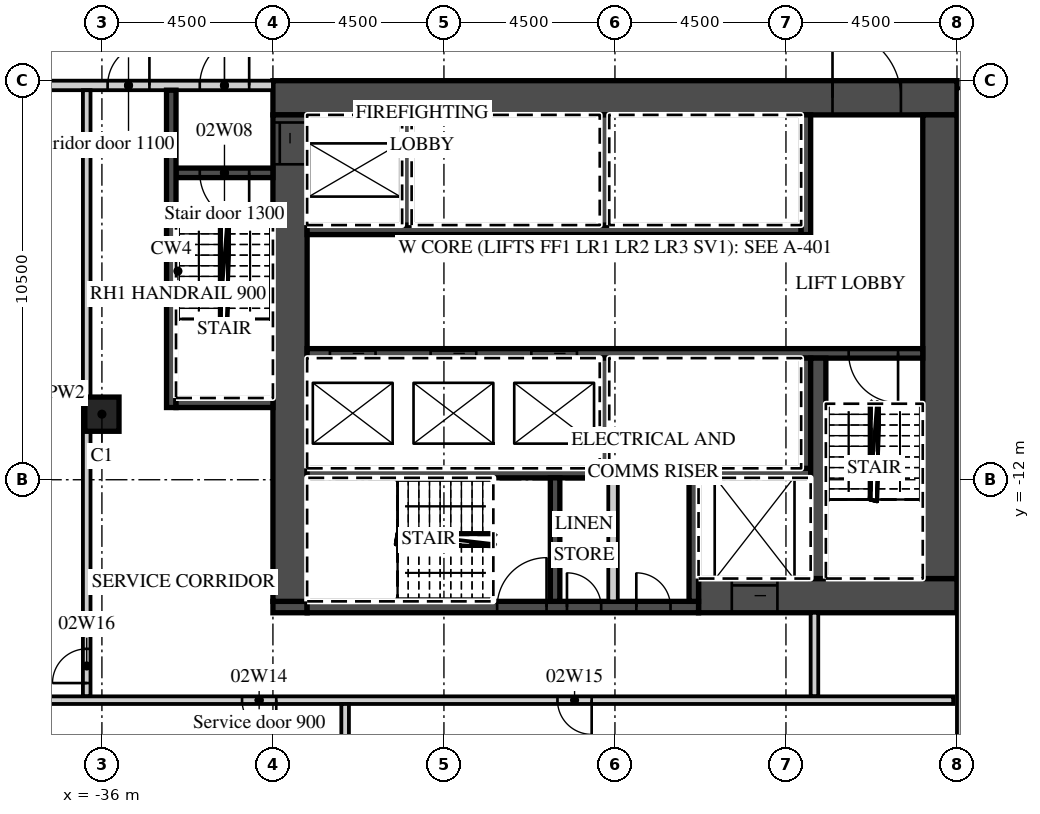
"""IFC4 building model, lengths in metres.
Left out: names, types, materials, properties, quantities, classifications, styles, units other than length and angle.
Written with IfcOpenShell. Run it as: python <this file> out.ifc"""

import sys

from ifc_helpers import new_model, si_unit, direction, frame, frame_2d, origin, origin_2d, place, context, subcontext, project, spatial, rectangle, extrude, element, fill, save


model = new_model("IFC4")
c1 = context("Model", 3, precision=1e-05, world=origin(), true_north=direction((0.0, 1.0)))
c2 = subcontext(c1, "Body", "Model", "MODEL_VIEW")
j1 = project(units=[si_unit("LENGTHUNIT", "METRE"), si_unit("PLANEANGLEUNIT", "RADIAN")], contexts=[c1])
p1 = place(None, origin())
s1 = spatial("IfcSite", under=j1, at=p1, CompositionType="ELEMENT")
p2 = place(p1, origin())
s2 = spatial("IfcBuilding", under=s1, at=p2, CompositionType="ELEMENT")
p3 = place(p2, frame((0.0, 0.0, 17.0)))
s3 = spatial("IfcBuildingStorey", under=s2, at=p3, CompositionType="ELEMENT", Elevation=17.0)
p4 = place(p3, frame((-36.0, -10.275, 0.0), z_axis=(0.0, 0.0, 1.0), x_axis=(1.0, 0.0, 0.0)))
e1 = element("IfcColumn", 1, at=p4, inside=s3, PredefinedType="COLUMN", context=c2, shape_type="SweptSolid", body=[
    extrude(rectangle(XDim=0.9, YDim=0.9, at=origin_2d()), origin(), (0.0, 0.0, 1.0), 6.5),
])
p5 = place(p3, frame((-31.5, -1.95, 0.0), z_axis=(0.0, 0.0, 1.0), x_axis=(1.0, 0.0, 0.0)))
e2 = element("IfcWall", 2, at=p5, inside=s3, PredefinedType="SHEAR", context=c2, shape_type="SweptSolid", body=[
    extrude(rectangle(XDim=18.0, YDim=0.9, at=frame_2d((9.0, 0.0))), origin(), (0.0, 0.0, 1.0), 6.05),
])
p6 = place(p5, frame((14.725, 0.0, 0.0)))
e3 = element("IfcOpeningElement", 3, at=p6, cuts=e2, PredefinedType="OPENING", context=c2, shape_type="SweptSolid", body=[
    extrude(rectangle(XDim=1.8, YDim=2.1, at=frame_2d((0.9, 1.05))), frame((0.0, 0.46, 0.0), z_axis=(0.0, -1.0, 0.0), x_axis=(1.0, 0.0, 0.0)), (0.0, 0.0, 1.0), 0.92),
])
p7 = place(p3, frame((-20.3, -15.05, 0.0), z_axis=(0.0, 0.0, 1.0), x_axis=(1.0, 0.0, 0.0)))
e4 = element("IfcWall", 4, at=p7, inside=s3, PredefinedType="SHEAR", context=c2, shape_type="SweptSolid", body=[
    extrude(rectangle(XDim=6.8, YDim=0.9, at=frame_2d((3.4, 0.0))), origin(), (0.0, 0.0, 1.0), 6.05),
])
p8 = place(p7, frame((0.875, 0.0, 0.0)))
e5 = element("IfcOpeningElement", 5, at=p8, cuts=e4, PredefinedType="OPENING", context=c2, shape_type="SweptSolid", body=[
    extrude(rectangle(XDim=1.2, YDim=2.1, at=frame_2d((0.6, 1.05))), frame((0.0, 0.46, 0.0), z_axis=(0.0, -1.0, 0.0), x_axis=(1.0, 0.0, 0.0)), (0.0, 0.0, 1.0), 0.92),
])
p9 = place(p3, frame((-31.5, -15.35, 0.0), z_axis=(0.0, 0.0, 1.0), x_axis=(1.0, 0.0, 0.0)))
e6 = element("IfcWall", 6, at=p9, inside=s3, PredefinedType="SHEAR", context=c2, shape_type="SweptSolid", body=[
    extrude(rectangle(XDim=0.9, YDim=0.3, at=frame_2d((0.45, 0.0))), origin(), (0.0, 0.0, 1.0), 6.05),
])
p10 = place(p3, frame((-30.6, -15.35, 0.0), z_axis=(0.0, 0.0, 1.0), x_axis=(1.0, 0.0, 0.0)))
e7 = element("IfcWall", 7, at=p10, inside=s3, PredefinedType="SHEAR", context=c2, shape_type="SweptSolid", body=[
    extrude(rectangle(XDim=10.3, YDim=0.3, at=frame_2d((5.15, 0.0))), origin(), (0.0, 0.0, 1.0), 6.05),
])
p11 = place(p10, frame((5.0, 0.0, 0.0)))
e8 = element("IfcOpeningElement", 8, at=p11, cuts=e7, PredefinedType="OPENING", context=c2, shape_type="SweptSolid", body=[
    extrude(rectangle(XDim=1.3, YDim=2.1, at=frame_2d((0.65, 1.05))), frame((0.0, 0.16, 0.0), z_axis=(0.0, -1.0, 0.0), x_axis=(1.0, 0.0, 0.0)), (0.0, 0.0, 1.0), 0.32),
])
p12 = place(p10, frame((6.837, 0.0, 0.0)))
e9 = element("IfcOpeningElement", 9, at=p12, cuts=e7, PredefinedType="OPENING", context=c2, shape_type="SweptSolid", body=[
    extrude(rectangle(XDim=0.9, YDim=2.1, at=frame_2d((0.45, 1.05))), frame((0.0, 0.16, 0.0), z_axis=(0.0, -1.0, 0.0), x_axis=(1.0, 0.0, 0.0)), (0.0, 0.0, 1.0), 0.32),
])
p13 = place(p10, frame((8.663, 0.0, 0.0)))
e10 = element("IfcOpeningElement", 10, at=p13, cuts=e7, PredefinedType="OPENING", context=c2, shape_type="SweptSolid", body=[
    extrude(rectangle(XDim=0.9, YDim=2.1, at=frame_2d((0.45, 1.05))), frame((0.0, 0.16, 0.0), z_axis=(0.0, -1.0, 0.0), x_axis=(1.0, 0.0, 0.0)), (0.0, 0.0, 1.0), 0.32),
])
p14 = place(p3, frame((-31.05, -15.2, 0.0), z_axis=(0.0, 0.0, 1.0), x_axis=(0.0, 1.0, 0.0)))
e11 = element("IfcWall", 11, at=p14, inside=s3, PredefinedType="SHEAR", context=c2, shape_type="SweptSolid", body=[
    extrude(rectangle(XDim=12.8, YDim=0.9, at=frame_2d((6.4, 0.0))), origin(), (0.0, 0.0, 1.0), 6.05),
])
p15 = place(p14, frame((11.5, 0.0, 0.0)))
e12 = element("IfcOpeningElement", 12, at=p15, cuts=e11, PredefinedType="OPENING", context=c2, shape_type="SweptSolid", body=[
    extrude(rectangle(XDim=1.1, YDim=2.1, at=frame_2d((0.55, 1.05))), frame((0.0, 0.46, 0.0), z_axis=(0.0, -1.0, 0.0), x_axis=(1.0, 0.0, 0.0)), (0.0, 0.0, 1.0), 0.92),
])
p16 = place(p3, frame((-13.95, -14.6, 0.0), z_axis=(0.0, 0.0, 1.0), x_axis=(0.0, 1.0, 0.0)))
e13 = element("IfcWall", 13, at=p16, inside=s3, PredefinedType="SHEAR", context=c2, shape_type="SweptSolid", body=[
    extrude(rectangle(XDim=12.2, YDim=0.9, at=frame_2d((6.1, 0.0))), origin(), (0.0, 0.0, 1.0), 6.05),
])
p17 = place(p3, frame((-30.6, -5.425, 0.0), z_axis=(0.0, 0.0, 1.0), x_axis=(1.0, 0.0, 0.0)))
e14 = element("IfcWall", 14, at=p17, inside=s3, PredefinedType="SHEAR", context=c2, shape_type="SweptSolid", body=[
    extrude(rectangle(XDim=13.0, YDim=0.25, at=frame_2d((6.5, 0.0))), origin(), (0.0, 0.0, 1.0), 6.05),
])
p18 = place(p3, frame((-17.475, -5.55, 0.0), z_axis=(0.0, 0.0, 1.0), x_axis=(0.0, 1.0, 0.0)))
e15 = element("IfcWall", 15, at=p18, inside=s3, PredefinedType="SHEAR", context=c2, shape_type="SweptSolid", body=[
    extrude(rectangle(XDim=3.15, YDim=0.25, at=frame_2d((1.575, 0.0))), origin(), (0.0, 0.0, 1.0), 6.05),
])
for number, where, z_axis, x_axis in (
    (16, (-27.975, -5.3, 0.0), (0.0, 0.0, 1.0), (0.0, 1.0, 0.0)),
    (17, (-22.775, -5.3, 0.0), (0.0, 0.0, 1.0), (0.0, 1.0, 0.0)),
):
    element("IfcWall", number, at=place(p3, frame(where, z_axis=z_axis, x_axis=x_axis)), inside=s3, PredefinedType="SHEAR", context=c2, shape_type="SweptSolid", body=[
        extrude(rectangle(XDim=2.9, YDim=0.25, at=frame_2d((1.45, 0.0))), origin(), (0.0, 0.0, 1.0), 6.05),
    ])
p19 = place(p3, frame((-30.6, -8.675, 0.0), z_axis=(0.0, 0.0, 1.0), x_axis=(1.0, 0.0, 0.0)))
e18 = element("IfcWall", 18, at=p19, inside=s3, PredefinedType="SHEAR", context=c2, shape_type="SweptSolid", body=[
    extrude(rectangle(XDim=16.2, YDim=0.25, at=frame_2d((8.1, 0.0))), origin(), (0.0, 0.0, 1.0), 6.05),
])
p20 = place(p19, frame((0.6, 0.0, 0.0)))
e19 = element("IfcOpeningElement", 19, at=p20, cuts=e18, PredefinedType="OPENING", context=c2, shape_type="SweptSolid", body=[
    extrude(rectangle(XDim=1.2, YDim=2.1, at=frame_2d((0.6, 1.05))), frame((0.0, 0.135, 0.0), z_axis=(0.0, -1.0, 0.0), x_axis=(1.0, 0.0, 0.0)), (0.0, 0.0, 1.0), 0.27),
])
p21 = place(p19, frame((3.25, 0.0, 0.0)))
e20 = element("IfcOpeningElement", 20, at=p21, cuts=e18, PredefinedType="OPENING", context=c2, shape_type="SweptSolid", body=[
    extrude(rectangle(XDim=1.2, YDim=2.1, at=frame_2d((0.6, 1.05))), frame((0.0, 0.135, 0.0), z_axis=(0.0, -1.0, 0.0), x_axis=(1.0, 0.0, 0.0)), (0.0, 0.0, 1.0), 0.27),
])
p22 = place(p19, frame((5.9, 0.0, 0.0)))
e21 = element("IfcOpeningElement", 21, at=p22, cuts=e18, PredefinedType="OPENING", context=c2, shape_type="SweptSolid", body=[
    extrude(rectangle(XDim=1.2, YDim=2.1, at=frame_2d((0.6, 1.05))), frame((0.0, 0.135, 0.0), z_axis=(0.0, -1.0, 0.0), x_axis=(1.0, 0.0, 0.0)), (0.0, 0.0, 1.0), 0.27),
])
p23 = place(p19, frame((14.25, 0.0, 0.0)))
e22 = element("IfcOpeningElement", 22, at=p23, cuts=e18, PredefinedType="OPENING", context=c2, shape_type="SweptSolid", body=[
    extrude(rectangle(XDim=1.3, YDim=2.1, at=frame_2d((0.65, 1.05))), frame((0.0, 0.135, 0.0), z_axis=(0.0, -1.0, 0.0), x_axis=(1.0, 0.0, 0.0)), (0.0, 0.0, 1.0), 0.27),
])
p24 = place(p3, frame((-30.6, -11.825, 0.0), z_axis=(0.0, 0.0, 1.0), x_axis=(1.0, 0.0, 0.0)))
e23 = element("IfcWall", 23, at=p24, inside=s3, PredefinedType="SHEAR", context=c2, shape_type="SweptSolid", body=[
    extrude(rectangle(XDim=13.25, YDim=0.25, at=frame_2d((6.625, 0.0))), origin(), (0.0, 0.0, 1.0), 6.05),
])
for number, where, z_axis, x_axis in (
    (24, (-17.475, -11.7, 0.0), (0.0, 0.0, 1.0), (0.0, 1.0, 0.0)),
    (25, (-22.775, -11.7, 0.0), (0.0, 0.0, 1.0), (0.0, 1.0, 0.0)),
):
    element("IfcWall", number, at=place(p3, frame(where, z_axis=z_axis, x_axis=x_axis)), inside=s3, PredefinedType="SHEAR", context=c2, shape_type="SweptSolid", body=[
        extrude(rectangle(XDim=2.9, YDim=0.25, at=frame_2d((1.45, 0.0))), origin(), (0.0, 0.0, 1.0), 6.05),
    ])
p25 = place(p3, frame((-17.15, -14.6, 0.0), z_axis=(0.0, 0.0, 1.0), x_axis=(0.0, 1.0, 0.0)))
e26 = element("IfcWall", 26, at=p25, inside=s3, PredefinedType="SHEAR", context=c2, shape_type="SweptSolid", body=[
    extrude(rectangle(XDim=5.8, YDim=0.4, at=frame_2d((2.9, 0.0))), origin(), (0.0, 0.0, 1.0), 6.05),
])
for number, where, z_axis, x_axis in (
    (27, (-20.425, -15.2, 0.0), (0.0, 0.0, 1.0), (0.0, 1.0, 0.0)),
    (28, (-24.075, -15.2, 0.0), (0.0, 0.0, 1.0), (0.0, 1.0, 0.0)),
):
    element("IfcWall", number, at=place(p3, frame(where, z_axis=z_axis, x_axis=x_axis)), inside=s3, PredefinedType="SHEAR", context=c2, shape_type="SweptSolid", body=[
        extrude(rectangle(XDim=3.25, YDim=0.25, at=frame_2d((1.625, 0.0))), origin(), (0.0, 0.0, 1.0), 6.05),
    ])
p26 = place(p3, frame((-22.55, -15.2, 0.0), z_axis=(0.0, 0.0, 1.0), x_axis=(0.0, 1.0, 0.0)))
e29 = element("IfcWall", 29, at=p26, inside=s3, PredefinedType="PARTITIONING", context=c2, shape_type="SweptSolid", body=[
    extrude(rectangle(XDim=3.25, YDim=0.25, at=frame_2d((1.625, 0.0))), origin(), (0.0, 0.0, 1.0), 6.05),
])
p27 = place(p3, frame((-44.55, -1.625, 0.0), z_axis=(0.0, 0.0, 1.0), x_axis=(1.0, 0.0, 0.0)))
e30 = element("IfcWall", 30, at=p27, inside=s3, PredefinedType="PARTITIONING", context=c2, shape_type="SweptSolid", body=[
    extrude(rectangle(XDim=13.05, YDim=0.25, at=frame_2d((6.525, 0.0))), origin(), (0.0, 0.0, 1.0), 6.05),
])
p28 = place(p27, frame((11.125, 0.0, 0.0)))
e31 = element("IfcOpeningElement", 31, at=p28, cuts=e30, PredefinedType="OPENING", context=c2, shape_type="SweptSolid", body=[
    extrude(rectangle(XDim=1.3, YDim=2.1, at=frame_2d((0.65, 1.05))), frame((0.0, 0.135, 0.0), z_axis=(0.0, -1.0, 0.0), x_axis=(1.0, 0.0, 0.0)), (0.0, 0.0, 1.0), 0.27),
])
p29 = place(p27, frame((8.7, 0.0, 0.0)))
e32 = element("IfcOpeningElement", 32, at=p29, cuts=e30, PredefinedType="OPENING", context=c2, shape_type="SweptSolid", body=[
    extrude(rectangle(XDim=1.1, YDim=2.1, at=frame_2d((0.55, 1.05))), frame((0.0, 0.135, 0.0), z_axis=(0.0, -1.0, 0.0), x_axis=(1.0, 0.0, 0.0)), (0.0, 0.0, 1.0), 0.27),
])
p30 = place(p3, frame((-34.05, -3.925, 0.0), z_axis=(0.0, 0.0, 1.0), x_axis=(1.0, 0.0, 0.0)))
e33 = element("IfcWall", 33, at=p30, inside=s3, PredefinedType="SHEAR", context=c2, shape_type="SweptSolid", body=[
    extrude(rectangle(XDim=2.55, YDim=0.25, at=frame_2d((1.275, 0.0))), origin(), (0.0, 0.0, 1.0), 6.05),
])
p31 = place(p30, frame((0.625, 0.0, 0.0)))
e34 = element("IfcOpeningElement", 34, at=p31, cuts=e33, PredefinedType="OPENING", context=c2, shape_type="SweptSolid", body=[
    extrude(rectangle(XDim=1.3, YDim=2.1, at=frame_2d((0.65, 1.05))), frame((0.0, 0.135, 0.0), z_axis=(0.0, -1.0, 0.0), x_axis=(1.0, 0.0, 0.0)), (0.0, 0.0, 1.0), 0.27),
])
p32 = place(p3, frame((-34.175, -10.1, 0.0), z_axis=(0.0, 0.0, 1.0), x_axis=(0.0, 1.0, 0.0)))
e35 = element("IfcWall", 35, at=p32, inside=s3, PredefinedType="SHEAR", context=c2, shape_type="SweptSolid", body=[
    extrude(rectangle(XDim=8.35, YDim=0.25, at=frame_2d((4.175, 0.0))), origin(), (0.0, 0.0, 1.0), 6.05),
])
p33 = place(p3, frame((-34.05, -9.975, 0.0), z_axis=(0.0, 0.0, 1.0), x_axis=(1.0, 0.0, 0.0)))
e36 = element("IfcWall", 36, at=p33, inside=s3, PredefinedType="SHEAR", context=c2, shape_type="SweptSolid", body=[
    extrude(rectangle(XDim=2.55, YDim=0.25, at=frame_2d((1.275, 0.0))), origin(), (0.0, 0.0, 1.0), 6.05),
])
p34 = place(p3, frame((-17.25, -17.7, 0.0), z_axis=(0.0, 0.0, 1.0), x_axis=(0.0, 1.0, 0.0)))
e37 = element("IfcWall", 37, at=p34, inside=s3, PredefinedType="PARTITIONING", context=c2, shape_type="SweptSolid", body=[
    extrude(rectangle(XDim=2.2, YDim=0.2, at=frame_2d((1.1, 0.0))), origin(), (0.0, 0.0, 1.0), 6.05),
])
p35 = place(p3, frame((-36.4, -17.7, 0.0), z_axis=(0.0, 0.0, 1.0), x_axis=(0.0, 1.0, 0.0)))
e38 = element("IfcWall", 38, at=p35, inside=s3, PredefinedType="PARTITIONING", context=c2, shape_type="SweptSolid", body=[
    extrude(rectangle(XDim=15.95, YDim=0.2, at=frame_2d((7.975, 0.0))), origin(), (0.0, 0.0, 1.0), 6.05),
])
p36 = place(p35, frame((0.35, 0.0, 0.0)))
e39 = element("IfcOpeningElement", 39, at=p36, cuts=e38, PredefinedType="OPENING", context=c2, shape_type="SweptSolid", body=[
    extrude(rectangle(XDim=0.9, YDim=2.1, at=frame_2d((0.45, 1.05))), frame((0.0, 0.11, 0.0), z_axis=(0.0, -1.0, 0.0), x_axis=(1.0, 0.0, 0.0)), (0.0, 0.0, 1.0), 0.22),
])
p37 = place(p3, frame((-44.55, -17.8, 0.0), z_axis=(0.0, 0.0, 1.0), x_axis=(1.0, 0.0, 0.0)))
e40 = element("IfcWall", 40, at=p37, inside=s3, PredefinedType="PARTITIONING", context=c2, shape_type="SweptSolid", body=[
    extrude(rectangle(XDim=30.95, YDim=0.2, at=frame_2d((15.475, 0.0))), origin(), (0.0, 0.0, 1.0), 6.05),
])
p38 = place(p37, frame((12.238, 0.0, 0.0)))
e41 = element("IfcOpeningElement", 41, at=p38, cuts=e40, PredefinedType="OPENING", context=c2, shape_type="SweptSolid", body=[
    extrude(rectangle(XDim=0.9, YDim=2.1, at=frame_2d((0.45, 1.05))), frame((0.0, 0.11, 0.0), z_axis=(0.0, -1.0, 0.0), x_axis=(1.0, 0.0, 0.0)), (0.0, 0.0, 1.0), 0.22),
])
p39 = place(p37, frame((20.538, 0.0, 0.0)))
e42 = element("IfcOpeningElement", 42, at=p39, cuts=e40, PredefinedType="OPENING", context=c2, shape_type="SweptSolid", body=[
    extrude(rectangle(XDim=0.9, YDim=2.1, at=frame_2d((0.45, 1.05))), frame((0.0, 0.11, 0.0), z_axis=(0.0, -1.0, 0.0), x_axis=(1.0, 0.0, 0.0)), (0.0, 0.0, 1.0), 0.22),
])
p40 = place(p3, frame((-29.6, -21.55, 0.0), z_axis=(0.0, 0.0, 1.0), x_axis=(0.0, 1.0, 0.0)))
e43 = element("IfcWall", 43, at=p40, inside=s3, PredefinedType="PARTITIONING", context=c2, shape_type="SweptSolid", body=[
    extrude(rectangle(XDim=3.65, YDim=0.2, at=frame_2d((1.825, 0.0))), origin(), (0.0, 0.0, 1.0), 6.05),
])
p41 = place(p3, frame((-13.4, -21.85, 0.0), z_axis=(0.0, 0.0, 1.0), x_axis=(0.0, 1.0, 0.0)))
e44 = element("IfcWall", 44, at=p41, inside=s3, PredefinedType="PARTITIONING", context=c2, shape_type="SweptSolid", body=[
    extrude(rectangle(XDim=20.15, YDim=0.2, at=frame_2d((10.075, 0.0))), origin(), (0.0, 0.0, 1.0), 6.05),
])
p42 = place(p20, origin())
e45 = element("IfcDoor", 45, at=p42, inside=s3, OperationType="SLIDING_TO_LEFT", PredefinedType="DOOR", context=c2, shape_type="SweptSolid", body=[
    extrude(rectangle(XDim=1.2, YDim=2.1, at=frame_2d((0.6, 1.05))), frame((0.0, 0.025, 0.0), z_axis=(0.0, -1.0, 0.0), x_axis=(1.0, 0.0, 0.0)), (0.0, 0.0, 1.0), 0.05),
])
fill(e19, e45)
p43 = place(p21, origin())
e46 = element("IfcDoor", 46, at=p43, inside=s3, OperationType="SLIDING_TO_RIGHT", PredefinedType="DOOR", context=c2, shape_type="SweptSolid", body=[
    extrude(rectangle(XDim=1.2, YDim=2.1, at=frame_2d((0.6, 1.05))), frame((0.0, 0.025, 0.0), z_axis=(0.0, -1.0, 0.0), x_axis=(1.0, 0.0, 0.0)), (0.0, 0.0, 1.0), 0.05),
])
fill(e20, e46)
p44 = place(p22, origin())
e47 = element("IfcDoor", 47, at=p44, inside=s3, OperationType="SLIDING_TO_RIGHT", PredefinedType="DOOR", context=c2, shape_type="SweptSolid", body=[
    extrude(rectangle(XDim=1.2, YDim=2.1, at=frame_2d((0.6, 1.05))), frame((0.0, 0.025, 0.0), z_axis=(0.0, -1.0, 0.0), x_axis=(1.0, 0.0, 0.0)), (0.0, 0.0, 1.0), 0.05),
])
fill(e21, e47)
p45 = place(p8, origin())
e48 = element("IfcDoor", 48, at=p45, inside=s3, OperationType="SLIDING_TO_LEFT", PredefinedType="DOOR", context=c2, shape_type="SweptSolid", body=[
    extrude(rectangle(XDim=1.2, YDim=2.1, at=frame_2d((0.6, 1.05))), frame((0.0, 0.025, 0.0), z_axis=(0.0, -1.0, 0.0), x_axis=(1.0, 0.0, 0.0)), (0.0, 0.0, 1.0), 0.05),
])
fill(e5, e48)
p46 = place(p15, origin())
e49 = element("IfcDoor", 49, at=p46, inside=s3, OperationType="SLIDING_TO_RIGHT", PredefinedType="DOOR", context=c2, shape_type="SweptSolid", body=[
    extrude(rectangle(XDim=1.1, YDim=2.1, at=frame_2d((0.55, 1.05))), frame((0.0, 0.025, 0.0), z_axis=(0.0, -1.0, 0.0), x_axis=(1.0, 0.0, 0.0)), (0.0, 0.0, 1.0), 0.05),
])
fill(e12, e49)
p47 = place(p6, origin())
e50 = element("IfcDoor", 50, at=p47, inside=s3, OperationType="DOUBLE_DOOR_DOUBLE_SWING", PredefinedType="DOOR", context=c2, shape_type="SweptSolid", body=[
    extrude(rectangle(XDim=1.8, YDim=2.1, at=frame_2d((0.9, 1.05))), frame((0.0, 0.025, 0.0), z_axis=(0.0, -1.0, 0.0), x_axis=(1.0, 0.0, 0.0)), (0.0, 0.0, 1.0), 0.05),
])
fill(e3, e50)
p48 = place(p28, origin())
e51 = element("IfcDoor", 51, at=p48, inside=s3, OperationType="SINGLE_SWING_RIGHT", PredefinedType="DOOR", context=c2, shape_type="SweptSolid", body=[
    extrude(rectangle(XDim=1.3, YDim=2.1, at=frame_2d((0.65, 1.05))), frame((0.0, 0.025, 0.0), z_axis=(0.0, -1.0, 0.0), x_axis=(1.0, 0.0, 0.0)), (0.0, 0.0, 1.0), 0.05),
])
fill(e31, e51)
p49 = place(p31, origin())
e52 = element("IfcDoor", 52, at=p49, inside=s3, OperationType="SINGLE_SWING_RIGHT", PredefinedType="DOOR", context=c2, shape_type="SweptSolid", body=[
    extrude(rectangle(XDim=1.3, YDim=2.1, at=frame_2d((0.65, 1.05))), frame((0.0, 0.025, 0.0), z_axis=(0.0, -1.0, 0.0), x_axis=(1.0, 0.0, 0.0)), (0.0, 0.0, 1.0), 0.05),
])
fill(e34, e52)
p50 = place(p29, origin())
e53 = element("IfcDoor", 53, at=p50, inside=s3, OperationType="SINGLE_SWING_RIGHT", PredefinedType="DOOR", context=c2, shape_type="SweptSolid", body=[
    extrude(rectangle(XDim=1.1, YDim=2.1, at=frame_2d((0.55, 1.05))), frame((0.0, 0.025, 0.0), z_axis=(0.0, -1.0, 0.0), x_axis=(1.0, 0.0, 0.0)), (0.0, 0.0, 1.0), 0.05),
])
fill(e32, e53)
p51 = place(p23, origin())
e54 = element("IfcDoor", 54, at=p51, inside=s3, OperationType="SINGLE_SWING_RIGHT", PredefinedType="DOOR", context=c2, shape_type="SweptSolid", body=[
    extrude(rectangle(XDim=1.3, YDim=2.1, at=frame_2d((0.65, 1.05))), frame((0.0, 0.025, 0.0), z_axis=(0.0, -1.0, 0.0), x_axis=(1.0, 0.0, 0.0)), (0.0, 0.0, 1.0), 0.05),
])
fill(e22, e54)
p52 = place(p11, origin())
e55 = element("IfcDoor", 55, at=p52, inside=s3, OperationType="SINGLE_SWING_RIGHT", PredefinedType="DOOR", context=c2, shape_type="SweptSolid", body=[
    extrude(rectangle(XDim=1.3, YDim=2.1, at=frame_2d((0.65, 1.05))), frame((0.0, 0.025, 0.0), z_axis=(0.0, -1.0, 0.0), x_axis=(1.0, 0.0, 0.0)), (0.0, 0.0, 1.0), 0.05),
])
fill(e8, e55)
p53 = place(p12, origin())
e56 = element("IfcDoor", 56, at=p53, inside=s3, OperationType="SINGLE_SWING_LEFT", PredefinedType="DOOR", context=c2, shape_type="SweptSolid", body=[
    extrude(rectangle(XDim=0.9, YDim=2.1, at=frame_2d((0.45, 1.05))), frame((0.0, 0.025, 0.0), z_axis=(0.0, -1.0, 0.0), x_axis=(1.0, 0.0, 0.0)), (0.0, 0.0, 1.0), 0.05),
])
fill(e9, e56)
p54 = place(p13, origin())
e57 = element("IfcDoor", 57, at=p54, inside=s3, OperationType="SINGLE_SWING_LEFT", PredefinedType="DOOR", context=c2, shape_type="SweptSolid", body=[
    extrude(rectangle(XDim=0.9, YDim=2.1, at=frame_2d((0.45, 1.05))), frame((0.0, 0.025, 0.0), z_axis=(0.0, -1.0, 0.0), x_axis=(1.0, 0.0, 0.0)), (0.0, 0.0, 1.0), 0.05),
])
fill(e10, e57)
p55 = place(p38, origin())
e58 = element("IfcDoor", 58, at=p55, inside=s3, OperationType="SINGLE_SWING_RIGHT", PredefinedType="DOOR", context=c2, shape_type="SweptSolid", body=[
    extrude(rectangle(XDim=0.9, YDim=2.1, at=frame_2d((0.45, 1.05))), frame((0.0, 0.025, 0.0), z_axis=(0.0, -1.0, 0.0), x_axis=(1.0, 0.0, 0.0)), (0.0, 0.0, 1.0), 0.05),
])
fill(e41, e58)
p56 = place(p39, origin())
e59 = element("IfcDoor", 59, at=p56, inside=s3, OperationType="SINGLE_SWING_RIGHT", PredefinedType="DOOR", context=c2, shape_type="SweptSolid", body=[
    extrude(rectangle(XDim=0.9, YDim=2.1, at=frame_2d((0.45, 1.05))), frame((0.0, 0.025, 0.0), z_axis=(0.0, -1.0, 0.0), x_axis=(1.0, 0.0, 0.0)), (0.0, 0.0, 1.0), 0.05),
])
fill(e42, e59)
p57 = place(p36, origin())
e60 = element("IfcDoor", 60, at=p57, inside=s3, OperationType="SINGLE_SWING_LEFT", PredefinedType="DOOR", context=c2, shape_type="SweptSolid", body=[
    extrude(rectangle(XDim=0.9, YDim=2.1, at=frame_2d((0.45, 1.05))), frame((0.0, 0.025, 0.0), z_axis=(0.0, -1.0, 0.0), x_axis=(1.0, 0.0, 0.0)), (0.0, 0.0, 1.0), 0.05),
])
fill(e39, e60)
save(model, sys.argv[1])
